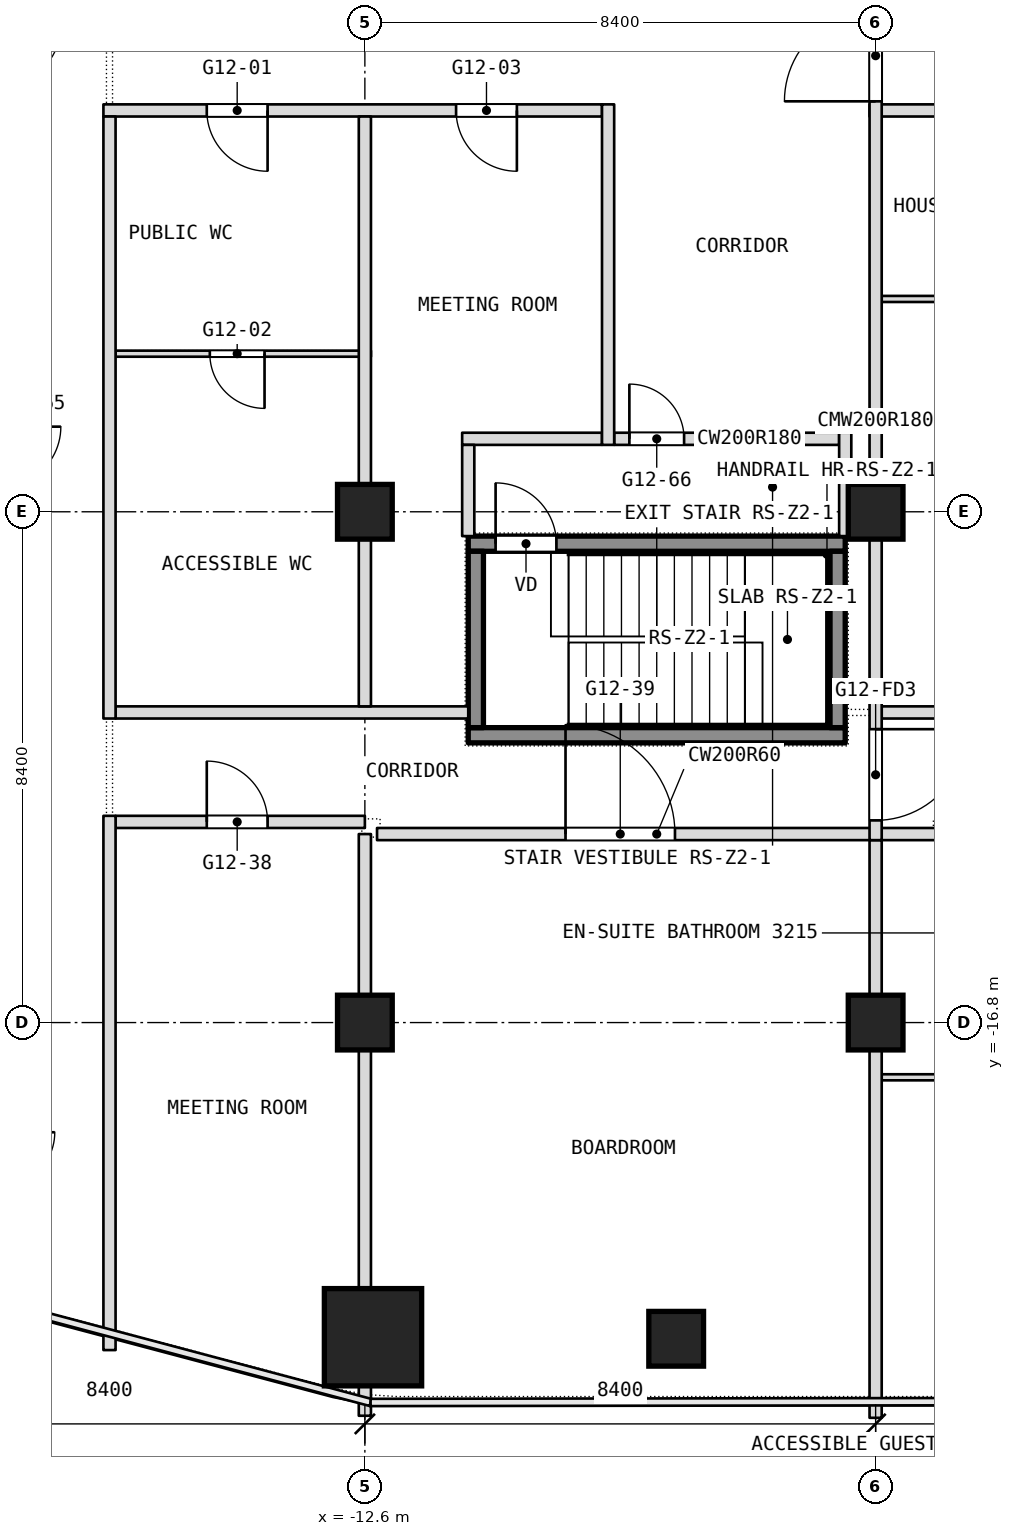
"""IFC4 building model, lengths in metres.
Left out: names, types, materials, properties, quantities, classifications, styles, units other than length and angle.
Written with IfcOpenShell. Run it as: python <this file> out.ifc"""

import sys

from ifc_helpers import new_model, si_unit, direction, frame, frame_2d, origin, origin_2d, place, context, subcontext, project, spatial, rectangle, extrude, element, fill, save


model = new_model("IFC4")
c1 = context("Model", 3, precision=1e-05, world=origin(), true_north=direction((0.0, 1.0)))
c2 = subcontext(c1, "Body", "Model", "MODEL_VIEW")
j1 = project(units=[si_unit("LENGTHUNIT", "METRE"), si_unit("PLANEANGLEUNIT", "RADIAN")], contexts=[c1])
p1 = place(None, origin())
s1 = spatial("IfcSite", under=j1, at=p1, CompositionType="ELEMENT")
p2 = place(p1, origin())
s2 = spatial("IfcBuilding", under=s1, at=p2, CompositionType="ELEMENT")
p3 = place(p2, frame((0.0, 0.0, 140.9)))
s3 = spatial("IfcBuildingStorey", under=s2, at=p3, CompositionType="ELEMENT", Elevation=140.9)
p4 = place(p3, frame((-12.466, -21.975, 0.0), z_axis=(0.0, 0.0, 1.0), x_axis=(1.0, 0.0, 0.0)))
e1 = element("IfcColumn", 1, at=p4, inside=s3, PredefinedType="COLUMN", context=c2, shape_type="SweptSolid", body=[
    extrude(rectangle(XDim=1.6, YDim=1.6, at=origin_2d()), origin(), (0.0, 0.0, 1.0), 3.6),
])
for number, where, z_axis, x_axis in (
    (2, (-12.6, -16.8, 0.0), (0.0, 0.0, 1.0), (1.0, 0.0, 0.0)),
    (3, (-12.6, -8.4, 0.0), (0.0, 0.0, 1.0), (1.0, 0.0, 0.0)),
    (4, (-4.2, -16.8, 0.0), (0.0, 0.0, 1.0), (1.0, 0.0, 0.0)),
    (5, (-4.2, -8.4, 0.0), (0.0, 0.0, 1.0), (1.0, 0.0, 0.0)),
    (6, (-7.48, -22.0, 0.0), (0.0, 0.0, 1.0), (1.0, 0.0, 0.0)),
):
    element("IfcColumn", number, at=place(p3, frame(where, z_axis=z_axis, x_axis=x_axis)), inside=s3, PredefinedType="COLUMN", context=c2, shape_type="SweptSolid", body=[
        extrude(rectangle(XDim=0.9, YDim=0.9, at=origin_2d()), origin(), (0.0, 0.0, 1.0), 3.6),
    ])
p5 = place(p3, frame((-4.1, -17.7, 0.0), z_axis=(0.0, 0.0, 1.0), x_axis=(1.0, 0.0, 0.0)))
e7 = element("IfcWall", 7, at=p5, inside=s3, PredefinedType="PARTITIONING", context=c2, shape_type="SweptSolid", body=[
    extrude(rectangle(XDim=2.35, YDim=0.1, at=frame_2d((1.175, 0.0))), origin(), (0.0, 0.0, 1.0), 3.34),
])
p6 = place(p5, frame((1.3, 0.0, 0.0)))
e8 = element("IfcOpeningElement", 8, at=p6, cuts=e7, PredefinedType="OPENING", context=c2, shape_type="SweptSolid", body=[
    extrude(rectangle(XDim=0.9, YDim=2.1, at=frame_2d((0.45, 1.05))), frame((0.0, 0.05, 0.0), z_axis=(0.0, -1.0, 0.0), x_axis=(1.0, 0.0, 0.0)), (0.0, 0.0, 1.0), 0.1),
])
p7 = place(p3, frame((-12.4, -13.7, 0.0), z_axis=(0.0, 0.0, 1.0), x_axis=(1.0, 0.0, 0.0)))
e9 = element("IfcWall", 9, at=p7, inside=s3, PredefinedType="PARTITIONING", context=c2, shape_type="SweptSolid", body=[
    extrude(rectangle(XDim=9.2, YDim=0.2, at=frame_2d((4.6, 0.0))), origin(), (0.0, 0.0, 1.0), 3.34),
])
p8 = place(p7, frame((3.1, 0.0, 0.0)))
e10 = element("IfcOpeningElement", 10, at=p8, cuts=e9, PredefinedType="OPENING", context=c2, shape_type="SweptSolid", body=[
    extrude(rectangle(XDim=1.8, YDim=2.1, at=frame_2d((0.9, 1.05))), frame((0.0, 0.1, 0.0), z_axis=(0.0, -1.0, 0.0), x_axis=(1.0, 0.0, 0.0)), (0.0, 0.0, 1.0), 0.2),
])
p9 = place(p3, frame((-16.7, -13.5, 0.0), z_axis=(0.0, 0.0, 1.0), x_axis=(1.0, 0.0, 0.0)))
e11 = element("IfcWall", 11, at=p9, inside=s3, PredefinedType="PARTITIONING", context=c2, shape_type="SweptSolid", body=[
    extrude(rectangle(XDim=4.1, YDim=0.2, at=frame_2d((2.05, 0.0))), origin(), (0.0, 0.0, 1.0), 3.34),
])
p10 = place(p9, frame((1.5, 0.0, 0.0)))
e12 = element("IfcOpeningElement", 12, at=p10, cuts=e11, PredefinedType="OPENING", context=c2, shape_type="SweptSolid", body=[
    extrude(rectangle(XDim=1.0, YDim=2.1, at=frame_2d((0.5, 1.05))), frame((0.0, 0.1, 0.0), z_axis=(0.0, -1.0, 0.0), x_axis=(1.0, 0.0, 0.0)), (0.0, 0.0, 1.0), 0.2),
])
p11 = place(p3, frame((-16.7, -11.7, 0.0), z_axis=(0.0, 0.0, 1.0), x_axis=(1.0, 0.0, 0.0)))
e13 = element("IfcWall", 13, at=p11, inside=s3, PredefinedType="PARTITIONING", context=c2, shape_type="SweptSolid", body=[
    extrude(rectangle(XDim=5.8, YDim=0.2, at=frame_2d((2.9, 0.0))), origin(), (0.0, 0.0, 1.0), 3.34),
])
p12 = place(p3, frame((-4.1, -11.7, 0.0), z_axis=(0.0, 0.0, 1.0), x_axis=(1.0, 0.0, 0.0)))
e14 = element("IfcWall", 14, at=p12, inside=s3, PredefinedType="PARTITIONING", context=c2, shape_type="SweptSolid", body=[
    extrude(rectangle(XDim=20.8, YDim=0.2, at=frame_2d((10.4, 0.0))), origin(), (0.0, 0.0, 1.0), 3.34),
])
p13 = place(p12, frame((14.1, 0.0, 0.0)))
e15 = element("IfcOpeningElement", 15, at=p13, cuts=e14, PredefinedType="OPENING", context=c2, shape_type="SweptSolid", body=[
    extrude(rectangle(XDim=1.0, YDim=2.1, at=frame_2d((0.5, 1.05))), frame((0.0, 0.1, 0.0), z_axis=(0.0, -1.0, 0.0), x_axis=(1.0, 0.0, 0.0)), (0.0, 0.0, 1.0), 0.2),
])
p14 = place(p12, frame((5.7, 0.0, 0.0)))
e16 = element("IfcOpeningElement", 16, at=p14, cuts=e14, PredefinedType="OPENING", context=c2, shape_type="SweptSolid", body=[
    extrude(rectangle(XDim=1.0, YDim=2.1, at=frame_2d((0.5, 1.05))), frame((0.0, 0.1, 0.0), z_axis=(0.0, -1.0, 0.0), x_axis=(1.0, 0.0, 0.0)), (0.0, 0.0, 1.0), 0.2),
])
p15 = place(p3, frame((-11.0, -7.2, 0.0), z_axis=(0.0, 0.0, 1.0), x_axis=(1.0, 0.0, 0.0)))
e17 = element("IfcWall", 17, at=p15, inside=s3, PredefinedType="PARTITIONING", context=c2, shape_type="SweptSolid", body=[
    extrude(rectangle(XDim=2.3, YDim=0.2, at=frame_2d((1.15, 0.0))), origin(), (0.0, 0.0, 1.0), 3.34),
])
p16 = place(p3, frame((-8.5, -7.2, 0.0), z_axis=(0.0, 0.0, 1.0), x_axis=(1.0, 0.0, 0.0)))
e18 = element("IfcWall", 18, at=p16, inside=s3, PredefinedType="PARTITIONING", context=c2, shape_type="SweptSolid", body=[
    extrude(rectangle(XDim=3.7, YDim=0.2, at=frame_2d((1.85, 0.0))), origin(), (0.0, 0.0, 1.0), 3.34),
])
p17 = place(p16, frame((0.25, 0.0, 0.0)))
e19 = element("IfcOpeningElement", 19, at=p17, cuts=e18, PredefinedType="OPENING", context=c2, shape_type="SweptSolid", body=[
    extrude(rectangle(XDim=0.9, YDim=2.1, at=frame_2d((0.45, 1.05))), frame((0.0, 0.1, 0.0), z_axis=(0.0, -1.0, 0.0), x_axis=(1.0, 0.0, 0.0)), (0.0, 0.0, 1.0), 0.2),
])
p18 = place(p3, frame((-16.7, -5.8, 0.0), z_axis=(0.0, 0.0, 1.0), x_axis=(1.0, 0.0, 0.0)))
e20 = element("IfcWall", 20, at=p18, inside=s3, PredefinedType="PARTITIONING", context=c2, shape_type="SweptSolid", body=[
    extrude(rectangle(XDim=4.2, YDim=0.1, at=frame_2d((2.1, 0.0))), origin(), (0.0, 0.0, 1.0), 3.34),
])
p19 = place(p18, frame((1.55, 0.0, 0.0)))
e21 = element("IfcOpeningElement", 21, at=p19, cuts=e20, PredefinedType="OPENING", context=c2, shape_type="SweptSolid", body=[
    extrude(rectangle(XDim=0.9, YDim=2.1, at=frame_2d((0.45, 1.05))), frame((0.0, 0.05, 0.0), z_axis=(0.0, -1.0, 0.0), x_axis=(1.0, 0.0, 0.0)), (0.0, 0.0, 1.0), 0.1),
])
p20 = place(p3, frame((-4.1, -4.9, 0.0), z_axis=(0.0, 0.0, 1.0), x_axis=(1.0, 0.0, 0.0)))
e22 = element("IfcWall", 22, at=p20, inside=s3, PredefinedType="PARTITIONING", context=c2, shape_type="SweptSolid", body=[
    extrude(rectangle(XDim=4.2, YDim=0.1, at=frame_2d((2.1, 0.0))), origin(), (0.0, 0.0, 1.0), 3.34),
])
p21 = place(p20, frame((1.55, 0.0, 0.0)))
e23 = element("IfcOpeningElement", 23, at=p21, cuts=e22, PredefinedType="OPENING", context=c2, shape_type="SweptSolid", body=[
    extrude(rectangle(XDim=0.9, YDim=2.1, at=frame_2d((0.45, 1.05))), frame((0.0, 0.05, 0.0), z_axis=(0.0, -1.0, 0.0), x_axis=(1.0, 0.0, 0.0)), (0.0, 0.0, 1.0), 0.1),
])
p22 = place(p3, frame((-16.9, -1.8, 0.0), z_axis=(0.0, 0.0, 1.0), x_axis=(1.0, 0.0, 0.0)))
e24 = element("IfcWall", 24, at=p22, inside=s3, PredefinedType="PARTITIONING", context=c2, shape_type="SweptSolid", body=[
    extrude(rectangle(XDim=8.2, YDim=0.2, at=frame_2d((4.1, 0.0))), origin(), (0.0, 0.0, 1.0), 3.34),
])
p23 = place(p22, frame((1.7, 0.0, 0.0)))
e25 = element("IfcOpeningElement", 25, at=p23, cuts=e24, PredefinedType="OPENING", context=c2, shape_type="SweptSolid", body=[
    extrude(rectangle(XDim=1.0, YDim=2.1, at=frame_2d((0.5, 1.05))), frame((0.0, 0.1, 0.0), z_axis=(0.0, -1.0, 0.0), x_axis=(1.0, 0.0, 0.0)), (0.0, 0.0, 1.0), 0.2),
])
p24 = place(p22, frame((5.8, 0.0, 0.0)))
e26 = element("IfcOpeningElement", 26, at=p24, cuts=e24, PredefinedType="OPENING", context=c2, shape_type="SweptSolid", body=[
    extrude(rectangle(XDim=1.0, YDim=2.1, at=frame_2d((0.5, 1.05))), frame((0.0, 0.1, 0.0), z_axis=(0.0, -1.0, 0.0), x_axis=(1.0, 0.0, 0.0)), (0.0, 0.0, 1.0), 0.2),
])
p25 = place(p3, frame((-4.3, -1.8, 0.0), z_axis=(0.0, 0.0, 1.0), x_axis=(1.0, 0.0, 0.0)))
e27 = element("IfcWall", 27, at=p25, inside=s3, PredefinedType="PARTITIONING", context=c2, shape_type="SweptSolid", body=[
    extrude(rectangle(XDim=11.3, YDim=0.2, at=frame_2d((5.65, 0.0))), origin(), (0.0, 0.0, 1.0), 3.34),
])
p26 = place(p25, frame((1.7, 0.0, 0.0)))
e28 = element("IfcOpeningElement", 28, at=p26, cuts=e27, PredefinedType="OPENING", context=c2, shape_type="SweptSolid", body=[
    extrude(rectangle(XDim=1.0, YDim=2.1, at=frame_2d((0.5, 1.05))), frame((0.0, 0.1, 0.0), z_axis=(0.0, -1.0, 0.0), x_axis=(1.0, 0.0, 0.0)), (0.0, 0.0, 1.0), 0.2),
])
p27 = place(p25, frame((10.1, 0.0, 0.0)))
e29 = element("IfcOpeningElement", 29, at=p27, cuts=e27, PredefinedType="OPENING", context=c2, shape_type="SweptSolid", body=[
    extrude(rectangle(XDim=1.0, YDim=2.1, at=frame_2d((0.5, 1.05))), frame((0.0, 0.1, 0.0), z_axis=(0.0, -1.0, 0.0), x_axis=(1.0, 0.0, 0.0)), (0.0, 0.0, 1.0), 0.2),
])
p28 = place(p25, frame((5.9, 0.0, 0.0)))
e30 = element("IfcOpeningElement", 30, at=p28, cuts=e27, PredefinedType="OPENING", context=c2, shape_type="SweptSolid", body=[
    extrude(rectangle(XDim=1.0, YDim=2.1, at=frame_2d((0.5, 1.05))), frame((0.0, 0.1, 0.0), z_axis=(0.0, -1.0, 0.0), x_axis=(1.0, 0.0, 0.0)), (0.0, 0.0, 1.0), 0.2),
])
p29 = place(p3, frame((-4.2, -23.3, 0.0), z_axis=(0.0, 0.0, 1.0), x_axis=(0.0, 1.0, 0.0)))
e31 = element("IfcWall", 31, at=p29, inside=s3, PredefinedType="PARTITIONING", context=c2, shape_type="SweptSolid", body=[
    extrude(rectangle(XDim=9.5, YDim=0.2, at=frame_2d((4.75, 0.0))), origin(), (0.0, 0.0, 1.0), 3.34),
])
p30 = place(p3, frame((-4.2, -13.8, 0.0), z_axis=(0.0, 0.0, 1.0), x_axis=(0.0, 1.0, 0.0)))
e32 = element("IfcWall", 32, at=p30, inside=s3, PredefinedType="PARTITIONING", context=c2, shape_type="SweptSolid", body=[
    extrude(rectangle(XDim=13.8, YDim=0.2, at=frame_2d((6.9, 0.0))), origin(), (0.0, 0.0, 1.0), 3.34),
])
p31 = place(p30, frame((12.15, 0.0, 0.0)))
e33 = element("IfcOpeningElement", 33, at=p31, cuts=e32, PredefinedType="OPENING", context=c2, shape_type="SweptSolid", body=[
    extrude(rectangle(XDim=1.5, YDim=2.1, at=frame_2d((0.75, 1.05))), frame((0.0, 0.1, 0.0), z_axis=(0.0, -1.0, 0.0), x_axis=(1.0, 0.0, 0.0)), (0.0, 0.0, 1.0), 0.2),
])
p32 = place(p30, frame((0.325, 0.0, 0.0)))
e34 = element("IfcOpeningElement", 34, at=p32, cuts=e32, PredefinedType="OPENING", context=c2, shape_type="SweptSolid", body=[
    extrude(rectangle(XDim=1.5, YDim=2.1, at=frame_2d((0.75, 1.05))), frame((0.0, 0.1, 0.0), z_axis=(0.0, -1.0, 0.0), x_axis=(1.0, 0.0, 0.0)), (0.0, 0.0, 1.0), 0.2),
])
p33 = place(p3, frame((-4.7, -8.8, 0.0), z_axis=(0.0, 0.0, 1.0), x_axis=(0.0, 1.0, 0.0)))
e35 = element("IfcWall", 35, at=p33, inside=s3, PredefinedType="PARTITIONING", context=c2, shape_type="SweptSolid", body=[
    extrude(rectangle(XDim=1.7, YDim=0.2, at=frame_2d((0.85, 0.0))), origin(), (0.0, 0.0, 1.0), 3.34),
])
p34 = place(p3, frame((-8.6, -7.3, 0.0), z_axis=(0.0, 0.0, 1.0), x_axis=(0.0, 1.0, 0.0)))
e36 = element("IfcWall", 36, at=p34, inside=s3, PredefinedType="PARTITIONING", context=c2, shape_type="SweptSolid", body=[
    extrude(rectangle(XDim=5.6, YDim=0.2, at=frame_2d((2.8, 0.0))), origin(), (0.0, 0.0, 1.0), 3.34),
])
p35 = place(p3, frame((-10.9, -8.8, 0.0), z_axis=(0.0, 0.0, 1.0), x_axis=(0.0, 1.0, 0.0)))
e37 = element("IfcWall", 37, at=p35, inside=s3, PredefinedType="PARTITIONING", context=c2, shape_type="SweptSolid", body=[
    extrude(rectangle(XDim=1.5, YDim=0.2, at=frame_2d((0.75, 0.0))), origin(), (0.0, 0.0, 1.0), 3.34),
])
p36 = place(p3, frame((-12.6, -23.266, 0.0), z_axis=(0.0, 0.0, 1.0), x_axis=(0.0, 1.0, 0.0)))
e38 = element("IfcWall", 38, at=p36, inside=s3, PredefinedType="PARTITIONING", context=c2, shape_type="SweptSolid", body=[
    extrude(rectangle(XDim=0.491, YDim=0.2, at=frame_2d((0.246, 0.0))), origin(), (0.0, 0.0, 1.0), 3.34),
])
p37 = place(p3, frame((-12.6, -21.175, 0.0), z_axis=(0.0, 0.0, 1.0), x_axis=(0.0, 1.0, 0.0)))
e39 = element("IfcWall", 39, at=p37, inside=s3, PredefinedType="PARTITIONING", context=c2, shape_type="SweptSolid", body=[
    extrude(rectangle(XDim=7.475, YDim=0.2, at=frame_2d((3.738, 0.0))), origin(), (0.0, 0.0, 1.0), 3.34),
])
p38 = place(p3, frame((-12.6, -11.6, 0.0), z_axis=(0.0, 0.0, 1.0), x_axis=(0.0, 1.0, 0.0)))
e40 = element("IfcWall", 40, at=p38, inside=s3, PredefinedType="PARTITIONING", context=c2, shape_type="SweptSolid", body=[
    extrude(rectangle(XDim=9.7, YDim=0.2, at=frame_2d((4.85, 0.0))), origin(), (0.0, 0.0, 1.0), 3.34),
])
p39 = place(p3, frame((-16.8, -22.186, 0.0), z_axis=(0.0, 0.0, 1.0), x_axis=(0.0, 1.0, 0.0)))
e41 = element("IfcWall", 41, at=p39, inside=s3, PredefinedType="PARTITIONING", context=c2, shape_type="SweptSolid", body=[
    extrude(rectangle(XDim=8.786, YDim=0.2, at=frame_2d((4.393, 0.0))), origin(), (0.0, 0.0, 1.0), 3.34),
])
p40 = place(p3, frame((-16.8, -11.8, 0.0), z_axis=(0.0, 0.0, 1.0), x_axis=(0.0, 1.0, 0.0)))
e42 = element("IfcWall", 42, at=p40, inside=s3, PredefinedType="PARTITIONING", context=c2, shape_type="SweptSolid", body=[
    extrude(rectangle(XDim=9.9, YDim=0.2, at=frame_2d((4.95, 0.0))), origin(), (0.0, 0.0, 1.0), 3.34),
])
p41 = place(p3, frame((-10.9, -12.075, 0.1), z_axis=(0.0, 0.0, 1.0), x_axis=(1.0, 0.0, 0.0)))
e43 = element("IfcWall", 43, at=p41, inside=s3, PredefinedType="SHEAR", context=c2, shape_type="SweptSolid", body=[
    extrude(rectangle(XDim=6.2, YDim=0.25, at=frame_2d((3.1, 0.0))), origin(), (0.0, 0.0, 1.0), 3.6),
])
p42 = place(p3, frame((-10.9, -8.925, 0.1), z_axis=(0.0, 0.0, 1.0), x_axis=(1.0, 0.0, 0.0)))
e44 = element("IfcWall", 44, at=p42, inside=s3, PredefinedType="SHEAR", context=c2, shape_type="SweptSolid", body=[
    extrude(rectangle(XDim=6.2, YDim=0.25, at=frame_2d((3.1, 0.0))), origin(), (0.0, 0.0, 1.0), 3.6),
])
p43 = place(p42, frame((0.45, 0.0, 0.0)))
e45 = element("IfcOpeningElement", 45, at=p43, cuts=e44, PredefinedType="OPENING", context=c2, shape_type="SweptSolid", body=[
    extrude(rectangle(XDim=1.0, YDim=2.1, at=frame_2d((0.5, 1.05))), frame((0.0, 0.125, 0.0), z_axis=(0.0, -1.0, 0.0), x_axis=(1.0, 0.0, 0.0)), (0.0, 0.0, 1.0), 0.25),
])
for number, where, z_axis, x_axis in (
    (46, (-10.775, -11.95, 0.1), (0.0, 0.0, 1.0), (0.0, 1.0, 0.0)),
    (47, (-4.825, -11.95, 0.1), (0.0, 0.0, 1.0), (0.0, 1.0, 0.0)),
):
    element("IfcWall", number, at=place(p3, frame(where, z_axis=z_axis, x_axis=x_axis)), inside=s3, PredefinedType="SHEAR", context=c2, shape_type="SweptSolid", body=[
        extrude(rectangle(XDim=2.9, YDim=0.25, at=frame_2d((1.45, 0.0))), origin(), (0.0, 0.0, 1.0), 3.6),
    ])
p44 = place(p8, origin())
e48 = element("IfcDoor", 48, at=p44, inside=s3, OperationType="DOUBLE_DOOR_SINGLE_SWING", PredefinedType="DOOR", context=c2, shape_type="SweptSolid", body=[
    extrude(rectangle(XDim=1.8, YDim=2.1, at=frame_2d((0.9, 1.05))), frame((0.0, 0.025, 0.0), z_axis=(0.0, -1.0, 0.0), x_axis=(1.0, 0.0, 0.0)), (0.0, 0.0, 1.0), 0.05),
])
fill(e10, e48)
p45 = place(p10, origin())
e49 = element("IfcDoor", 49, at=p45, inside=s3, OperationType="SINGLE_SWING_LEFT", PredefinedType="DOOR", context=c2, shape_type="SweptSolid", body=[
    extrude(rectangle(XDim=1.0, YDim=2.1, at=frame_2d((0.5, 1.05))), frame((0.0, 0.025, 0.0), z_axis=(0.0, -1.0, 0.0), x_axis=(1.0, 0.0, 0.0)), (0.0, 0.0, 1.0), 0.05),
])
fill(e12, e49)
p46 = place(p17, origin())
e50 = element("IfcDoor", 50, at=p46, inside=s3, OperationType="SINGLE_SWING_RIGHT", PredefinedType="DOOR", context=c2, shape_type="SweptSolid", body=[
    extrude(rectangle(XDim=0.9, YDim=2.1, at=frame_2d((0.45, 1.05))), frame((0.0, 0.025, 0.0), z_axis=(0.0, -1.0, 0.0), x_axis=(1.0, 0.0, 0.0)), (0.0, 0.0, 1.0), 0.05),
])
fill(e19, e50)
p47 = place(p19, origin())
e51 = element("IfcDoor", 51, at=p47, inside=s3, OperationType="SINGLE_SWING_RIGHT", PredefinedType="DOOR", context=c2, shape_type="SweptSolid", body=[
    extrude(rectangle(XDim=0.9, YDim=2.1, at=frame_2d((0.45, 1.05))), frame((0.0, 0.025, 0.0), z_axis=(0.0, -1.0, 0.0), x_axis=(1.0, 0.0, 0.0)), (0.0, 0.0, 1.0), 0.05),
])
fill(e21, e51)
p48 = place(p23, origin())
e52 = element("IfcDoor", 52, at=p48, inside=s3, OperationType="SINGLE_SWING_LEFT", PredefinedType="DOOR", context=c2, shape_type="SweptSolid", body=[
    extrude(rectangle(XDim=1.0, YDim=2.1, at=frame_2d((0.5, 1.05))), frame((0.0, 0.025, 0.0), z_axis=(0.0, -1.0, 0.0), x_axis=(1.0, 0.0, 0.0)), (0.0, 0.0, 1.0), 0.05),
])
fill(e25, e52)
p49 = place(p24, origin())
e53 = element("IfcDoor", 53, at=p49, inside=s3, OperationType="SINGLE_SWING_LEFT", PredefinedType="DOOR", context=c2, shape_type="SweptSolid", body=[
    extrude(rectangle(XDim=1.0, YDim=2.1, at=frame_2d((0.5, 1.05))), frame((0.0, 0.025, 0.0), z_axis=(0.0, -1.0, 0.0), x_axis=(1.0, 0.0, 0.0)), (0.0, 0.0, 1.0), 0.05),
])
fill(e26, e53)
p50 = place(p43, origin())
e54 = element("IfcDoor", 54, at=p50, inside=s3, OperationType="SINGLE_SWING_LEFT", PredefinedType="DOOR", context=c2, shape_type="SweptSolid", body=[
    extrude(rectangle(XDim=1.0, YDim=2.1, at=frame_2d((0.5, 1.05))), frame((0.0, 0.025, 0.0), z_axis=(0.0, -1.0, 0.0), x_axis=(1.0, 0.0, 0.0)), (0.0, 0.0, 1.0), 0.05),
])
fill(e45, e54)
p51 = place(p31, origin())
e55 = element("IfcDoor", 55, at=p51, inside=s3, OperationType="DOUBLE_DOOR_DOUBLE_SWING", PredefinedType="DOOR", context=c2, shape_type="SweptSolid", body=[
    extrude(rectangle(XDim=1.5, YDim=2.1, at=frame_2d((0.75, 1.05))), frame((0.0, 0.025, 0.0), z_axis=(0.0, -1.0, 0.0), x_axis=(1.0, 0.0, 0.0)), (0.0, 0.0, 1.0), 0.05),
])
fill(e33, e55)
p52 = place(p32, origin())
e56 = element("IfcDoor", 56, at=p52, inside=s3, OperationType="DOUBLE_DOOR_DOUBLE_SWING", PredefinedType="DOOR", context=c2, shape_type="SweptSolid", body=[
    extrude(rectangle(XDim=1.5, YDim=2.1, at=frame_2d((0.75, 1.05))), frame((0.0, 0.025, 0.0), z_axis=(0.0, -1.0, 0.0), x_axis=(1.0, 0.0, 0.0)), (0.0, 0.0, 1.0), 0.05),
])
fill(e34, e56)
save(model, sys.argv[1])
